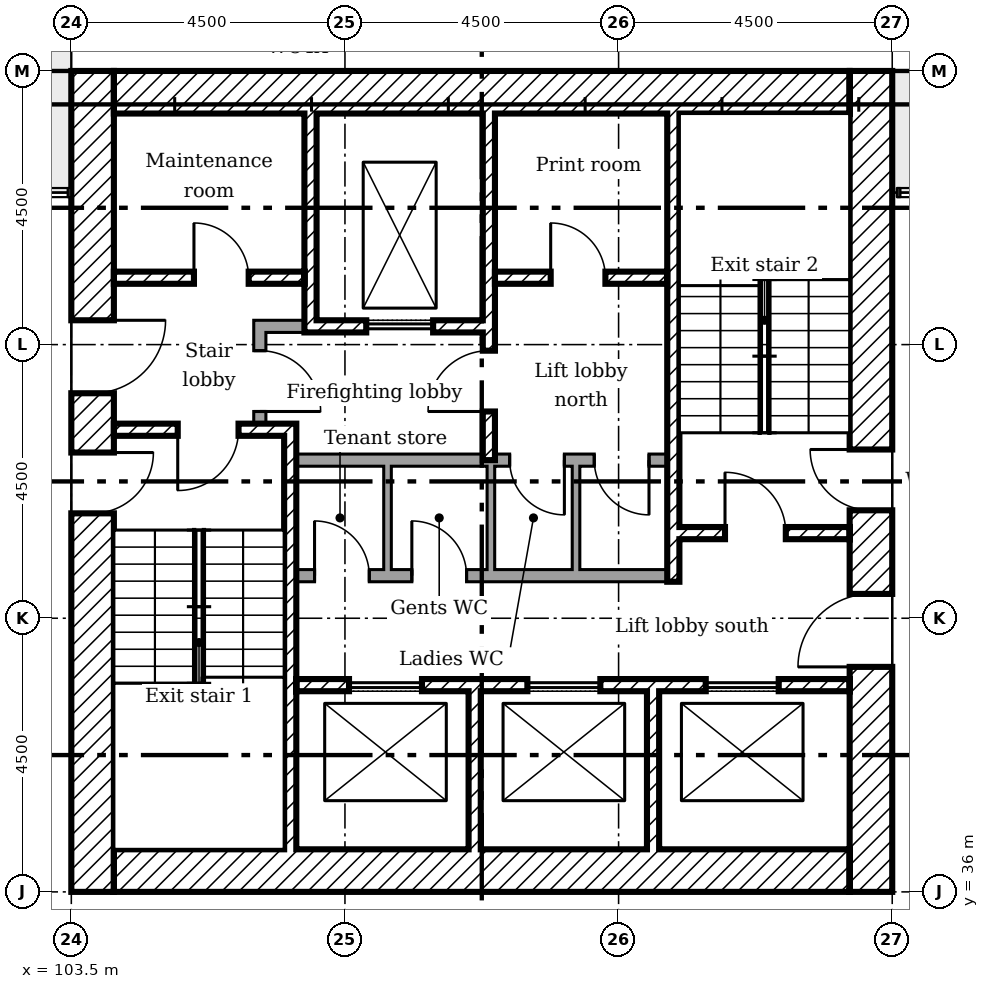
"""IFC4 building model, lengths in metres.
Left out: names, types, materials, properties, quantities, classifications, styles, units other than length and angle.
Written with IfcOpenShell. Run it as: python <this file> out.ifc"""

import sys

from ifc_helpers import new_model, si_unit, direction, frame, frame_2d, origin, place, context, subcontext, project, spatial, rectangle, extrude, element, fill, save


model = new_model("IFC4")
c1 = context("Model", 3, precision=1e-05, world=origin(), true_north=direction((0.0, 1.0)))
c2 = subcontext(c1, "Body", "Model", "MODEL_VIEW")
j1 = project(units=[si_unit("LENGTHUNIT", "METRE"), si_unit("PLANEANGLEUNIT", "RADIAN")], contexts=[c1])
p1 = place(None, origin())
s1 = spatial("IfcSite", under=j1, at=p1, CompositionType="ELEMENT")
p2 = place(p1, origin())
s2 = spatial("IfcBuilding", under=s1, at=p2, CompositionType="ELEMENT")
p3 = place(p2, frame((0.0, 0.0, 106.4)))
s3 = spatial("IfcBuildingStorey", under=s2, at=p3, CompositionType="ELEMENT", Elevation=106.4)
p4 = place(p3, frame((116.65, 36.0, 0.0), z_axis=(0.0, 0.0, 1.0), x_axis=(0.0, 1.0, 0.0)))
e1 = element("IfcWall", 1, at=p4, inside=s3, PredefinedType="SHEAR", context=c2, shape_type="SweptSolid", body=[
    extrude(rectangle(XDim=13.5, YDim=0.7, at=frame_2d((6.75, 0.0))), origin(), (0.0, 0.0, 1.0), 3.35),
])
p5 = place(p4, frame((3.7, 0.0, 0.0)))
e2 = element("IfcOpeningElement", 2, at=p5, cuts=e1, PredefinedType="OPENING", context=c2, shape_type="SweptSolid", body=[
    extrude(rectangle(XDim=1.2, YDim=2.1, at=frame_2d((0.6, 1.05))), frame((0.0, 0.36, 0.0), z_axis=(0.0, -1.0, 0.0), x_axis=(1.0, 0.0, 0.0)), (0.0, 0.0, 1.0), 0.72),
])
p6 = place(p4, frame((6.275, 0.0, 0.0)))
e3 = element("IfcOpeningElement", 3, at=p6, cuts=e1, PredefinedType="OPENING", context=c2, shape_type="SweptSolid", body=[
    extrude(rectangle(XDim=1.0, YDim=2.1, at=frame_2d((0.5, 1.05))), frame((0.0, 0.36, 0.0), z_axis=(0.0, -1.0, 0.0), x_axis=(1.0, 0.0, 0.0)), (0.0, 0.0, 1.0), 0.72),
])
for number, where in (
    (4, (104.2, 49.15, 0.0)),
    (5, (104.2, 36.35, 0.0)),
):
    element("IfcWall", number, at=place(p3, frame(where)), inside=s3, PredefinedType="SHEAR", context=c2, shape_type="SweptSolid", body=[
        extrude(rectangle(XDim=12.1, YDim=0.7, at=frame_2d((6.05, 0.0))), origin(), (0.0, 0.0, 1.0), 3.35),
    ])
p7 = place(p3, frame((103.85, 36.0, 0.0), z_axis=(0.0, 0.0, 1.0), x_axis=(0.0, 1.0, 0.0)))
e6 = element("IfcWall", 6, at=p7, inside=s3, PredefinedType="SHEAR", context=c2, shape_type="SweptSolid", body=[
    extrude(rectangle(XDim=13.5, YDim=0.7, at=frame_2d((6.75, 0.0))), origin(), (0.0, 0.0, 1.0), 3.35),
])
p8 = place(p7, frame((8.2, 0.0, 0.0)))
e7 = element("IfcOpeningElement", 7, at=p8, cuts=e6, PredefinedType="OPENING", context=c2, shape_type="SweptSolid", body=[
    extrude(rectangle(XDim=1.2, YDim=2.1, at=frame_2d((0.6, 1.05))), frame((0.0, 0.36, 0.0), z_axis=(0.0, -1.0, 0.0), x_axis=(1.0, 0.0, 0.0)), (0.0, 0.0, 1.0), 0.72),
])
p9 = place(p7, frame((6.225, 0.0, 0.0)))
e8 = element("IfcOpeningElement", 8, at=p9, cuts=e6, PredefinedType="OPENING", context=c2, shape_type="SweptSolid", body=[
    extrude(rectangle(XDim=1.0, YDim=2.1, at=frame_2d((0.5, 1.05))), frame((0.0, 0.36, 0.0), z_axis=(0.0, -1.0, 0.0), x_axis=(1.0, 0.0, 0.0)), (0.0, 0.0, 1.0), 0.72),
])
p10 = place(p3, frame((107.433, 48.8, 0.0), z_axis=(0.0, 0.0, 1.0), x_axis=(0.0, -1.0, 0.0)))
e9 = element("IfcWall", 9, at=p10, inside=s3, PredefinedType="SHEAR", context=c2, shape_type="SweptSolid", body=[
    extrude(rectangle(XDim=3.6, YDim=0.2, at=frame_2d((1.8, 0.0))), origin(), (0.0, 0.0, 1.0), 3.35),
])
p11 = place(p3, frame((110.367, 48.8, 0.0), z_axis=(0.0, 0.0, 1.0), x_axis=(0.0, -1.0, 0.0)))
e10 = element("IfcWall", 10, at=p11, inside=s3, PredefinedType="SHEAR", context=c2, shape_type="SweptSolid", body=[
    extrude(rectangle(XDim=5.7, YDim=0.2, at=frame_2d((2.85, 0.0))), origin(), (0.0, 0.0, 1.0), 3.35),
])
p12 = place(p11, frame((3.9, 0.0, 0.0)))
e11 = element("IfcOpeningElement", 11, at=p12, cuts=e10, PredefinedType="OPENING", context=c2, shape_type="SweptSolid", body=[
    extrude(rectangle(XDim=1.0, YDim=2.1, at=frame_2d((0.5, 1.05))), frame((0.0, 0.11, 0.0), z_axis=(0.0, -1.0, 0.0), x_axis=(1.0, 0.0, 0.0)), (0.0, 0.0, 1.0), 0.22),
])
for number, where, z_axis, x_axis in (
    (12, (110.133, 36.7, 0.0), (0.0, 0.0, 1.0), (0.0, 1.0, 0.0)),
    (13, (113.067, 36.7, 0.0), (0.0, 0.0, 1.0), (0.0, 1.0, 0.0)),
):
    element("IfcWall", number, at=place(p3, frame(where, z_axis=z_axis, x_axis=x_axis)), inside=s3, PredefinedType="SHEAR", context=c2, shape_type="SweptSolid", body=[
        extrude(rectangle(XDim=2.6, YDim=0.2, at=frame_2d((1.3, 0.0))), origin(), (0.0, 0.0, 1.0), 3.35),
    ])
p13 = place(p3, frame((106.5, 45.3, 0.0)))
e14 = element("IfcWall", 14, at=p13, inside=s3, PredefinedType="PARTITIONING", context=c2, shape_type="SweptSolid", body=[
    extrude(rectangle(XDim=0.833, YDim=0.2, at=frame_2d((0.417, 0.0))), origin(), (0.0, 0.0, 1.0), 3.35),
])
p14 = place(p3, frame((106.6, 43.7, 0.0), z_axis=(0.0, 0.0, 1.0), x_axis=(0.0, 1.0, 0.0)))
e15 = element("IfcWall", 15, at=p14, inside=s3, PredefinedType="PARTITIONING", context=c2, shape_type="SweptSolid", body=[
    extrude(rectangle(XDim=1.5, YDim=0.2, at=frame_2d((0.75, 0.0))), origin(), (0.0, 0.0, 1.0), 3.35),
])
p15 = place(p14, frame((0.2, 0.0, 0.0)))
e16 = element("IfcOpeningElement", 16, at=p15, cuts=e15, PredefinedType="OPENING", context=c2, shape_type="SweptSolid", body=[
    extrude(rectangle(XDim=1.0, YDim=2.1, at=frame_2d((0.5, 1.05))), frame((0.0, 0.11, 0.0), z_axis=(0.0, -1.0, 0.0), x_axis=(1.0, 0.0, 0.0)), (0.0, 0.0, 1.0), 0.22),
])
p16 = place(p3, frame((104.2, 46.1, 0.0)))
e17 = element("IfcWall", 17, at=p16, inside=s3, PredefinedType="SHEAR", context=c2, shape_type="SweptSolid", body=[
    extrude(rectangle(XDim=3.133, YDim=0.2, at=frame_2d((1.567, 0.0))), origin(), (0.0, 0.0, 1.0), 3.35),
])
p17 = place(p16, frame((1.317, 0.0, 0.0)))
e18 = element("IfcOpeningElement", 18, at=p17, cuts=e17, PredefinedType="OPENING", context=c2, shape_type="SweptSolid", body=[
    extrude(rectangle(XDim=0.9, YDim=2.1, at=frame_2d((0.45, 1.05))), frame((0.0, 0.11, 0.0), z_axis=(0.0, -1.0, 0.0), x_axis=(1.0, 0.0, 0.0)), (0.0, 0.0, 1.0), 0.22),
])
p18 = place(p3, frame((110.467, 46.1, 0.0)))
e19 = element("IfcWall", 19, at=p18, inside=s3, PredefinedType="SHEAR", context=c2, shape_type="SweptSolid", body=[
    extrude(rectangle(XDim=2.833, YDim=0.2, at=frame_2d((1.417, 0.0))), origin(), (0.0, 0.0, 1.0), 3.35),
])
p19 = place(p18, frame((0.917, 0.0, 0.0)))
e20 = element("IfcOpeningElement", 20, at=p19, cuts=e19, PredefinedType="OPENING", context=c2, shape_type="SweptSolid", body=[
    extrude(rectangle(XDim=0.9, YDim=2.1, at=frame_2d((0.45, 1.05))), frame((0.0, 0.11, 0.0), z_axis=(0.0, -1.0, 0.0), x_axis=(1.0, 0.0, 0.0)), (0.0, 0.0, 1.0), 0.22),
])
p20 = place(p3, frame((107.533, 45.3, 0.0)))
e21 = element("IfcWall", 21, at=p20, inside=s3, PredefinedType="SHEAR", context=c2, shape_type="SweptSolid", body=[
    extrude(rectangle(XDim=2.733, YDim=0.2, at=frame_2d((1.367, 0.0))), origin(), (0.0, 0.0, 1.0), 3.35),
])
p21 = place(p20, frame((0.817, 0.0, 0.0)))
e22 = element("IfcOpeningElement", 22, at=p21, cuts=e21, PredefinedType="OPENING", context=c2, shape_type="SweptSolid", body=[
    extrude(rectangle(XDim=1.1, YDim=2.1, at=frame_2d((0.55, 1.05))), frame((0.0, 0.11, 0.0), z_axis=(0.0, -1.0, 0.0), x_axis=(1.0, 0.0, 0.0)), (0.0, 0.0, 1.0), 0.22),
])
p22 = place(p3, frame((107.2, 39.4, 0.0)))
e23 = element("IfcWall", 23, at=p22, inside=s3, PredefinedType="SHEAR", context=c2, shape_type="SweptSolid", body=[
    extrude(rectangle(XDim=9.1, YDim=0.2, at=frame_2d((4.55, 0.0))), origin(), (0.0, 0.0, 1.0), 3.35),
])
p23 = place(p22, frame((0.867, 0.0, 0.0)))
e24 = element("IfcOpeningElement", 24, at=p23, cuts=e23, PredefinedType="OPENING", context=c2, shape_type="SweptSolid", body=[
    extrude(rectangle(XDim=1.2, YDim=2.1, at=frame_2d((0.6, 1.05))), frame((0.0, 0.11, 0.0), z_axis=(0.0, -1.0, 0.0), x_axis=(1.0, 0.0, 0.0)), (0.0, 0.0, 1.0), 0.22),
])
p24 = place(p22, frame((3.8, 0.0, 0.0)))
e25 = element("IfcOpeningElement", 25, at=p24, cuts=e23, PredefinedType="OPENING", context=c2, shape_type="SweptSolid", body=[
    extrude(rectangle(XDim=1.2, YDim=2.1, at=frame_2d((0.6, 1.05))), frame((0.0, 0.11, 0.0), z_axis=(0.0, -1.0, 0.0), x_axis=(1.0, 0.0, 0.0)), (0.0, 0.0, 1.0), 0.22),
])
p25 = place(p22, frame((6.733, 0.0, 0.0)))
e26 = element("IfcOpeningElement", 26, at=p25, cuts=e23, PredefinedType="OPENING", context=c2, shape_type="SweptSolid", body=[
    extrude(rectangle(XDim=1.2, YDim=2.1, at=frame_2d((0.6, 1.05))), frame((0.0, 0.11, 0.0), z_axis=(0.0, -1.0, 0.0), x_axis=(1.0, 0.0, 0.0)), (0.0, 0.0, 1.0), 0.22),
])
p26 = place(p3, frame((107.1, 36.7, 0.0), z_axis=(0.0, 0.0, 1.0), x_axis=(0.0, 1.0, 0.0)))
e27 = element("IfcWall", 27, at=p26, inside=s3, PredefinedType="SHEAR", context=c2, shape_type="SweptSolid", body=[
    extrude(rectangle(XDim=7.0, YDim=0.2, at=frame_2d((3.5, 0.0))), origin(), (0.0, 0.0, 1.0), 3.35),
])
p27 = place(p3, frame((104.2, 43.6, 0.0)))
e28 = element("IfcWall", 28, at=p27, inside=s3, PredefinedType="SHEAR", context=c2, shape_type="SweptSolid", body=[
    extrude(rectangle(XDim=2.8, YDim=0.2, at=frame_2d((1.4, 0.0))), origin(), (0.0, 0.0, 1.0), 3.35),
])
p28 = place(p27, frame((1.05, 0.0, 0.0)))
e29 = element("IfcOpeningElement", 29, at=p28, cuts=e28, PredefinedType="OPENING", context=c2, shape_type="SweptSolid", body=[
    extrude(rectangle(XDim=1.0, YDim=2.1, at=frame_2d((0.5, 1.05))), frame((0.0, 0.11, 0.0), z_axis=(0.0, -1.0, 0.0), x_axis=(1.0, 0.0, 0.0)), (0.0, 0.0, 1.0), 0.22),
])
p29 = place(p3, frame((113.5, 41.9, 0.0)))
e30 = element("IfcWall", 30, at=p29, inside=s3, PredefinedType="SHEAR", context=c2, shape_type="SweptSolid", body=[
    extrude(rectangle(XDim=2.8, YDim=0.2, at=frame_2d((1.4, 0.0))), origin(), (0.0, 0.0, 1.0), 3.35),
])
p30 = place(p29, frame((0.75, 0.0, 0.0)))
e31 = element("IfcOpeningElement", 31, at=p30, cuts=e30, PredefinedType="OPENING", context=c2, shape_type="SweptSolid", body=[
    extrude(rectangle(XDim=1.0, YDim=2.1, at=frame_2d((0.5, 1.05))), frame((0.0, 0.11, 0.0), z_axis=(0.0, -1.0, 0.0), x_axis=(1.0, 0.0, 0.0)), (0.0, 0.0, 1.0), 0.22),
])
p31 = place(p3, frame((113.4, 41.1, 0.0), z_axis=(0.0, 0.0, 1.0), x_axis=(0.0, 1.0, 0.0)))
e32 = element("IfcWall", 32, at=p31, inside=s3, PredefinedType="SHEAR", context=c2, shape_type="SweptSolid", body=[
    extrude(rectangle(XDim=7.7, YDim=0.2, at=frame_2d((3.85, 0.0))), origin(), (0.0, 0.0, 1.0), 3.35),
])
p32 = place(p3, frame((107.2, 43.1, 0.0)))
e33 = element("IfcWall", 33, at=p32, inside=s3, PredefinedType="PARTITIONING", context=c2, shape_type="SweptSolid", body=[
    extrude(rectangle(XDim=6.1, YDim=0.2, at=frame_2d((3.05, 0.0))), origin(), (0.0, 0.0, 1.0), 3.35),
])
p33 = place(p32, frame((3.509, 0.0, 0.0)))
e34 = element("IfcOpeningElement", 34, at=p33, cuts=e33, PredefinedType="OPENING", context=c2, shape_type="SweptSolid", body=[
    extrude(rectangle(XDim=0.9, YDim=2.1, at=frame_2d((0.45, 1.05))), frame((0.0, 0.11, 0.0), z_axis=(0.0, -1.0, 0.0), x_axis=(1.0, 0.0, 0.0)), (0.0, 0.0, 1.0), 0.22),
])
p34 = place(p32, frame((4.9, 0.0, 0.0)))
e35 = element("IfcOpeningElement", 35, at=p34, cuts=e33, PredefinedType="OPENING", context=c2, shape_type="SweptSolid", body=[
    extrude(rectangle(XDim=0.9, YDim=2.1, at=frame_2d((0.45, 1.05))), frame((0.0, 0.11, 0.0), z_axis=(0.0, -1.0, 0.0), x_axis=(1.0, 0.0, 0.0)), (0.0, 0.0, 1.0), 0.22),
])
p35 = place(p3, frame((107.2, 41.2, 0.0)))
e36 = element("IfcWall", 36, at=p35, inside=s3, PredefinedType="PARTITIONING", context=c2, shape_type="SweptSolid", body=[
    extrude(rectangle(XDim=6.1, YDim=0.2, at=frame_2d((3.05, 0.0))), origin(), (0.0, 0.0, 1.0), 3.35),
])
p36 = place(p35, frame((0.3, 0.0, 0.0)))
e37 = element("IfcOpeningElement", 37, at=p36, cuts=e36, PredefinedType="OPENING", context=c2, shape_type="SweptSolid", body=[
    extrude(rectangle(XDim=0.9, YDim=2.1, at=frame_2d((0.45, 1.05))), frame((0.0, 0.11, 0.0), z_axis=(0.0, -1.0, 0.0), x_axis=(1.0, 0.0, 0.0)), (0.0, 0.0, 1.0), 0.22),
])
p37 = place(p35, frame((1.9, 0.0, 0.0)))
e38 = element("IfcOpeningElement", 38, at=p37, cuts=e36, PredefinedType="OPENING", context=c2, shape_type="SweptSolid", body=[
    extrude(rectangle(XDim=0.9, YDim=2.1, at=frame_2d((0.45, 1.05))), frame((0.0, 0.11, 0.0), z_axis=(0.0, -1.0, 0.0), x_axis=(1.0, 0.0, 0.0)), (0.0, 0.0, 1.0), 0.22),
])
for number, where, z_axis, x_axis in (
    (39, (108.7, 41.3, 0.0), (0.0, 0.0, 1.0), (0.0, 1.0, 0.0)),
    (40, (110.4, 41.3, 0.0), (0.0, 0.0, 1.0), (0.0, 1.0, 0.0)),
    (41, (111.8, 41.3, 0.0), (0.0, 0.0, 1.0), (0.0, 1.0, 0.0)),
):
    element("IfcWall", number, at=place(p3, frame(where, z_axis=z_axis, x_axis=x_axis)), inside=s3, PredefinedType="PARTITIONING", context=c2, shape_type="SweptSolid", body=[
        extrude(rectangle(XDim=1.7, YDim=0.125, at=frame_2d((0.85, 0.0))), origin(), (0.0, 0.0, 1.0), 3.35),
    ])
p38 = place(p8, frame((1.2, 0.0, 0.0), x_axis=(-1.0, 0.0, 0.0)))
e42 = element("IfcDoor", 42, at=p38, inside=s3, OperationType="SINGLE_SWING_RIGHT", PredefinedType="DOOR", context=c2, shape_type="SweptSolid", body=[
    extrude(rectangle(XDim=1.2, YDim=2.1, at=frame_2d((0.6, 1.05))), frame((0.0, 0.025, 0.0), z_axis=(0.0, -1.0, 0.0), x_axis=(1.0, 0.0, 0.0)), (0.0, 0.0, 1.0), 0.05),
])
fill(e7, e42)
p39 = place(p5, origin())
e43 = element("IfcDoor", 43, at=p39, inside=s3, OperationType="SINGLE_SWING_RIGHT", PredefinedType="DOOR", context=c2, shape_type="SweptSolid", body=[
    extrude(rectangle(XDim=1.2, YDim=2.1, at=frame_2d((0.6, 1.05))), frame((0.0, 0.025, 0.0), z_axis=(0.0, -1.0, 0.0), x_axis=(1.0, 0.0, 0.0)), (0.0, 0.0, 1.0), 0.05),
])
fill(e2, e43)
p40 = place(p28, frame((1.0, 0.0, 0.0), x_axis=(-1.0, 0.0, 0.0)))
e44 = element("IfcDoor", 44, at=p40, inside=s3, OperationType="SINGLE_SWING_LEFT", PredefinedType="DOOR", context=c2, shape_type="SweptSolid", body=[
    extrude(rectangle(XDim=1.0, YDim=2.1, at=frame_2d((0.5, 1.05))), frame((0.0, 0.025, 0.0), z_axis=(0.0, -1.0, 0.0), x_axis=(1.0, 0.0, 0.0)), (0.0, 0.0, 1.0), 0.05),
])
fill(e29, e44)
p41 = place(p9, frame((1.0, 0.0, 0.0), x_axis=(-1.0, 0.0, 0.0)))
e45 = element("IfcDoor", 45, at=p41, inside=s3, OperationType="SINGLE_SWING_RIGHT", PredefinedType="DOOR", context=c2, shape_type="SweptSolid", body=[
    extrude(rectangle(XDim=1.0, YDim=2.1, at=frame_2d((0.5, 1.05))), frame((0.0, 0.025, 0.0), z_axis=(0.0, -1.0, 0.0), x_axis=(1.0, 0.0, 0.0)), (0.0, 0.0, 1.0), 0.05),
])
fill(e8, e45)
p42 = place(p30, origin())
e46 = element("IfcDoor", 46, at=p42, inside=s3, OperationType="SINGLE_SWING_RIGHT", PredefinedType="DOOR", context=c2, shape_type="SweptSolid", body=[
    extrude(rectangle(XDim=1.0, YDim=2.1, at=frame_2d((0.5, 1.05))), frame((0.0, 0.025, 0.0), z_axis=(0.0, -1.0, 0.0), x_axis=(1.0, 0.0, 0.0)), (0.0, 0.0, 1.0), 0.05),
])
fill(e31, e46)
p43 = place(p6, origin())
e47 = element("IfcDoor", 47, at=p43, inside=s3, OperationType="SINGLE_SWING_LEFT", PredefinedType="DOOR", context=c2, shape_type="SweptSolid", body=[
    extrude(rectangle(XDim=1.0, YDim=2.1, at=frame_2d((0.5, 1.05))), frame((0.0, 0.025, 0.0), z_axis=(0.0, -1.0, 0.0), x_axis=(1.0, 0.0, 0.0)), (0.0, 0.0, 1.0), 0.05),
])
fill(e3, e47)
p44 = place(p12, frame((1.0, 0.0, 0.0), x_axis=(-1.0, 0.0, 0.0)))
e48 = element("IfcDoor", 48, at=p44, inside=s3, OperationType="SINGLE_SWING_RIGHT", PredefinedType="DOOR", context=c2, shape_type="SweptSolid", body=[
    extrude(rectangle(XDim=1.0, YDim=2.1, at=frame_2d((0.5, 1.05))), frame((0.0, 0.025, 0.0), z_axis=(0.0, -1.0, 0.0), x_axis=(1.0, 0.0, 0.0)), (0.0, 0.0, 1.0), 0.05),
])
fill(e11, e48)
p45 = place(p15, frame((1.0, 0.0, 0.0), x_axis=(-1.0, 0.0, 0.0)))
e49 = element("IfcDoor", 49, at=p45, inside=s3, OperationType="SINGLE_SWING_LEFT", PredefinedType="DOOR", context=c2, shape_type="SweptSolid", body=[
    extrude(rectangle(XDim=1.0, YDim=2.1, at=frame_2d((0.5, 1.05))), frame((0.0, 0.025, 0.0), z_axis=(0.0, -1.0, 0.0), x_axis=(1.0, 0.0, 0.0)), (0.0, 0.0, 1.0), 0.05),
])
fill(e16, e49)
p46 = place(p17, origin())
e50 = element("IfcDoor", 50, at=p46, inside=s3, OperationType="SINGLE_SWING_RIGHT", PredefinedType="DOOR", context=c2, shape_type="SweptSolid", body=[
    extrude(rectangle(XDim=0.9, YDim=2.1, at=frame_2d((0.45, 1.05))), frame((0.0, 0.025, 0.0), z_axis=(0.0, -1.0, 0.0), x_axis=(1.0, 0.0, 0.0)), (0.0, 0.0, 1.0), 0.05),
])
fill(e18, e50)
p47 = place(p19, origin())
e51 = element("IfcDoor", 51, at=p47, inside=s3, OperationType="SINGLE_SWING_RIGHT", PredefinedType="DOOR", context=c2, shape_type="SweptSolid", body=[
    extrude(rectangle(XDim=0.9, YDim=2.1, at=frame_2d((0.45, 1.05))), frame((0.0, 0.025, 0.0), z_axis=(0.0, -1.0, 0.0), x_axis=(1.0, 0.0, 0.0)), (0.0, 0.0, 1.0), 0.05),
])
fill(e20, e51)
p48 = place(p36, origin())
e52 = element("IfcDoor", 52, at=p48, inside=s3, OperationType="SINGLE_SWING_RIGHT", PredefinedType="DOOR", context=c2, shape_type="SweptSolid", body=[
    extrude(rectangle(XDim=0.9, YDim=2.1, at=frame_2d((0.45, 1.05))), frame((0.0, 0.025, 0.0), z_axis=(0.0, -1.0, 0.0), x_axis=(1.0, 0.0, 0.0)), (0.0, 0.0, 1.0), 0.05),
])
fill(e37, e52)
p49 = place(p37, origin())
e53 = element("IfcDoor", 53, at=p49, inside=s3, OperationType="SINGLE_SWING_RIGHT", PredefinedType="DOOR", context=c2, shape_type="SweptSolid", body=[
    extrude(rectangle(XDim=0.9, YDim=2.1, at=frame_2d((0.45, 1.05))), frame((0.0, 0.025, 0.0), z_axis=(0.0, -1.0, 0.0), x_axis=(1.0, 0.0, 0.0)), (0.0, 0.0, 1.0), 0.05),
])
fill(e38, e53)
p50 = place(p33, frame((0.9, 0.0, 0.0), x_axis=(-1.0, 0.0, 0.0)))
e54 = element("IfcDoor", 54, at=p50, inside=s3, OperationType="SINGLE_SWING_RIGHT", PredefinedType="DOOR", context=c2, shape_type="SweptSolid", body=[
    extrude(rectangle(XDim=0.9, YDim=2.1, at=frame_2d((0.45, 1.05))), frame((0.0, 0.025, 0.0), z_axis=(0.0, -1.0, 0.0), x_axis=(1.0, 0.0, 0.0)), (0.0, 0.0, 1.0), 0.05),
])
fill(e34, e54)
p51 = place(p34, frame((0.9, 0.0, 0.0), x_axis=(-1.0, 0.0, 0.0)))
e55 = element("IfcDoor", 55, at=p51, inside=s3, OperationType="SINGLE_SWING_RIGHT", PredefinedType="DOOR", context=c2, shape_type="SweptSolid", body=[
    extrude(rectangle(XDim=0.9, YDim=2.1, at=frame_2d((0.45, 1.05))), frame((0.0, 0.025, 0.0), z_axis=(0.0, -1.0, 0.0), x_axis=(1.0, 0.0, 0.0)), (0.0, 0.0, 1.0), 0.05),
])
fill(e35, e55)
p52 = place(p21, origin())
e56 = element("IfcDoor", 56, at=p52, inside=s3, OperationType="SLIDING_TO_LEFT", PredefinedType="DOOR", context=c2, shape_type="SweptSolid", body=[
    extrude(rectangle(XDim=1.1, YDim=2.1, at=frame_2d((0.55, 1.05))), frame((0.0, 0.025, 0.0), z_axis=(0.0, -1.0, 0.0), x_axis=(1.0, 0.0, 0.0)), (0.0, 0.0, 1.0), 0.05),
])
fill(e22, e56)
p53 = place(p23, origin())
e57 = element("IfcDoor", 57, at=p53, inside=s3, OperationType="SLIDING_TO_LEFT", PredefinedType="DOOR", context=c2, shape_type="SweptSolid", body=[
    extrude(rectangle(XDim=1.2, YDim=2.1, at=frame_2d((0.6, 1.05))), frame((0.0, 0.025, 0.0), z_axis=(0.0, -1.0, 0.0), x_axis=(1.0, 0.0, 0.0)), (0.0, 0.0, 1.0), 0.05),
])
fill(e24, e57)
p54 = place(p24, origin())
e58 = element("IfcDoor", 58, at=p54, inside=s3, OperationType="SLIDING_TO_LEFT", PredefinedType="DOOR", context=c2, shape_type="SweptSolid", body=[
    extrude(rectangle(XDim=1.2, YDim=2.1, at=frame_2d((0.6, 1.05))), frame((0.0, 0.025, 0.0), z_axis=(0.0, -1.0, 0.0), x_axis=(1.0, 0.0, 0.0)), (0.0, 0.0, 1.0), 0.05),
])
fill(e25, e58)
p55 = place(p25, origin())
e59 = element("IfcDoor", 59, at=p55, inside=s3, OperationType="SLIDING_TO_LEFT", PredefinedType="DOOR", context=c2, shape_type="SweptSolid", body=[
    extrude(rectangle(XDim=1.2, YDim=2.1, at=frame_2d((0.6, 1.05))), frame((0.0, 0.025, 0.0), z_axis=(0.0, -1.0, 0.0), x_axis=(1.0, 0.0, 0.0)), (0.0, 0.0, 1.0), 0.05),
])
fill(e26, e59)
save(model, sys.argv[1])
